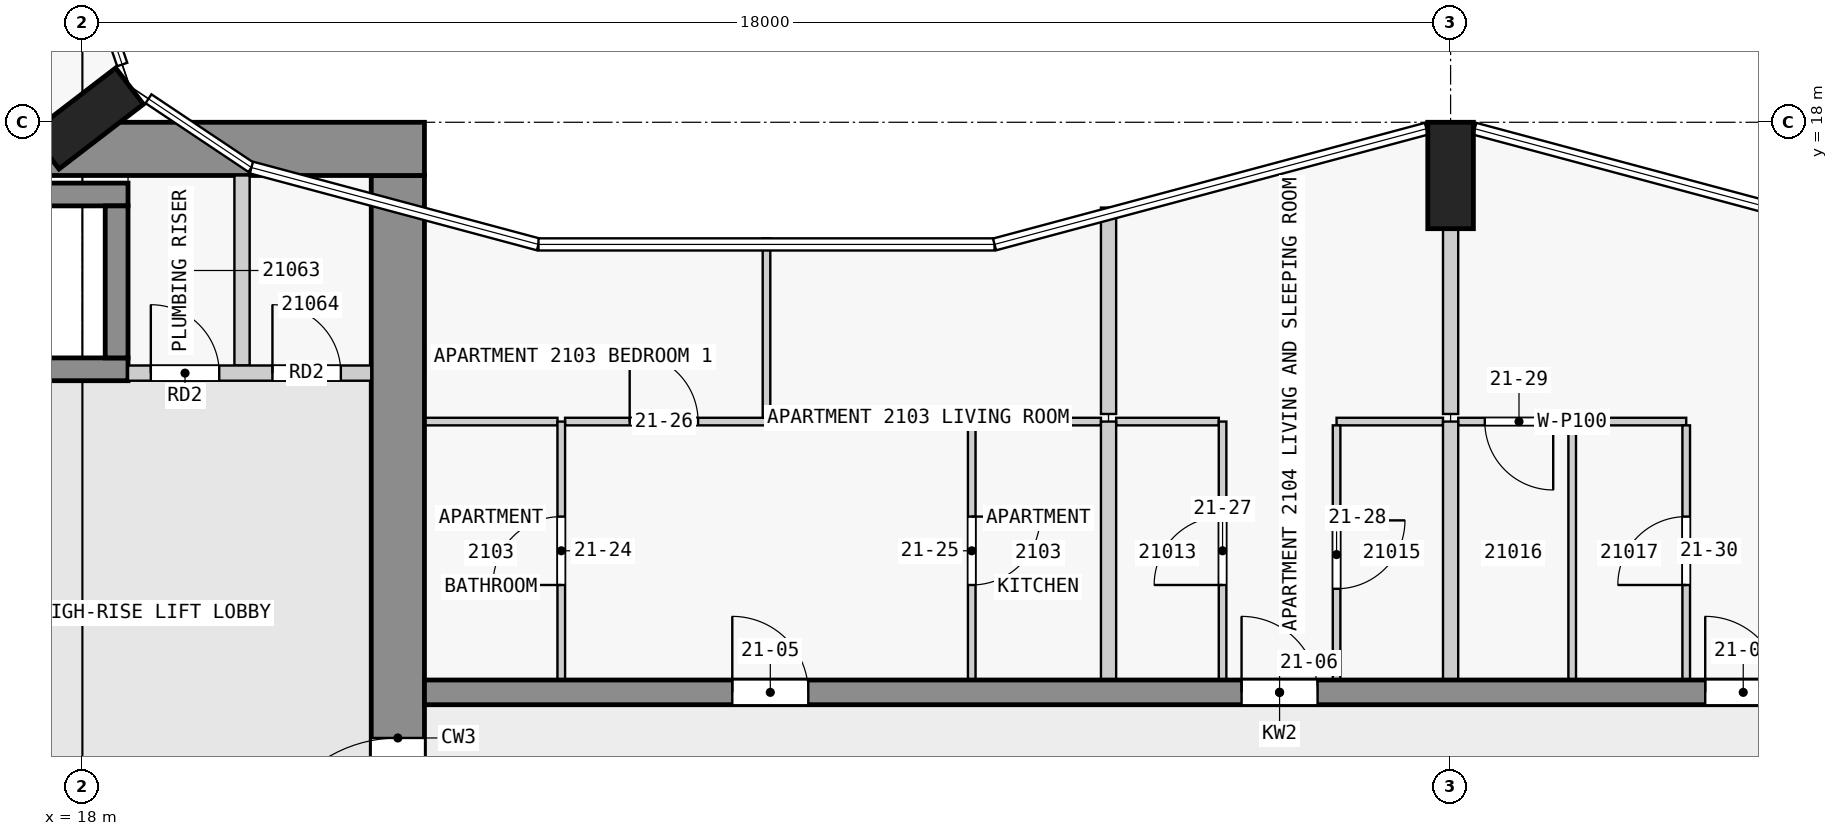
"""IFC4 building model, lengths in metres.
Left out: names, types, materials, properties, quantities, classifications, styles, units other than length and angle.
Written with IfcOpenShell. Run it as: python <this file> out.ifc"""

import sys

from ifc_helpers import new_model, si_unit, direction, frame, frame_2d, origin, origin_2d, place, context, subcontext, project, spatial, rectangle, extrude, element, fill, save


model = new_model("IFC4")
c1 = context("Model", 3, precision=1e-05, world=origin(), true_north=direction((0.0, 1.0)))
c2 = subcontext(c1, "Body", "Model", "MODEL_VIEW")
j1 = project(units=[si_unit("LENGTHUNIT", "METRE"), si_unit("PLANEANGLEUNIT", "RADIAN")], contexts=[c1])
p1 = place(None, origin())
s1 = spatial("IfcSite", under=j1, at=p1, CompositionType="ELEMENT")
p2 = place(p1, origin())
s2 = spatial("IfcBuilding", under=s1, at=p2, CompositionType="ELEMENT")
p3 = place(p2, frame((0.0, 0.0, 85.3)))
s3 = spatial("IfcBuildingStorey", under=s2, at=p3, CompositionType="ELEMENT", Elevation=85.3)
for number, where, z_axis, x_axis in (
    (1, (36.0, 17.3, 0.0), (0.0, 0.0, 1.0), (1.0, 0.0, 0.0)),
    (2, (18.065, 18.05, 0.0), (0.0, 0.0, 1.0), (-0.609, 0.793, 0.0)),
):
    element("IfcColumn", number, at=place(p3, frame(where, z_axis=z_axis, x_axis=x_axis)), inside=s3, PredefinedType="COLUMN", context=c2, shape_type="SweptSolid", body=[
        extrude(rectangle(XDim=0.6, YDim=1.4, at=origin_2d()), origin(), (0.0, 0.0, 1.0), 3.5),
    ])
p4 = place(p3, frame((1.6, 17.65, 0.0), z_axis=(0.0, 0.0, 1.0), x_axis=(1.0, 0.0, 0.0)))
e3 = element("IfcWall", 3, at=p4, inside=s3, PredefinedType="SHEAR", context=c2, shape_type="SweptSolid", body=[
    extrude(rectangle(XDim=20.9, YDim=0.7, at=frame_2d((10.45, 0.0))), origin(), (0.0, 0.0, 1.0), 3.25),
])
p5 = place(p4, frame((6.5, 0.0, 0.0)))
e4 = element("IfcOpeningElement", 4, at=p5, cuts=e3, PredefinedType="OPENING", context=c2, shape_type="SweptSolid", body=[
    extrude(rectangle(XDim=1.8, YDim=2.1, at=frame_2d((0.9, 1.05))), frame((0.0, 0.36, 0.0), z_axis=(0.0, -1.0, 0.0), x_axis=(1.0, 0.0, 0.0)), (0.0, 0.0, 1.0), 0.72),
])
p6 = place(p3, frame((22.15, 2.5, 0.0), z_axis=(0.0, 0.0, 1.0), x_axis=(0.0, 1.0, 0.0)))
e5 = element("IfcWall", 5, at=p6, inside=s3, PredefinedType="SHEAR", context=c2, shape_type="SweptSolid", body=[
    extrude(rectangle(XDim=14.8, YDim=0.7, at=frame_2d((7.4, 0.0))), origin(), (0.0, 0.0, 1.0), 3.25),
])
p7 = place(p6, frame((5.6, 0.0, 0.0)))
e6 = element("IfcOpeningElement", 6, at=p7, cuts=e5, PredefinedType="OPENING", context=c2, shape_type="SweptSolid", body=[
    extrude(rectangle(XDim=1.8, YDim=2.1, at=frame_2d((0.9, 1.05))), frame((0.0, 0.36, 0.0), z_axis=(0.0, -1.0, 0.0), x_axis=(1.0, 0.0, 0.0)), (0.0, 0.0, 1.0), 0.72),
])
for number, where, z_axis, x_axis in (
    (7, (10.8, 17.05, 0.0), (0.0, 0.0, 1.0), (1.0, 0.0, 0.0)),
    (8, (10.8, 14.75, 0.0), (0.0, 0.0, 1.0), (1.0, 0.0, 0.0)),
):
    element("IfcWall", number, at=place(p3, frame(where, z_axis=z_axis, x_axis=x_axis)), inside=s3, PredefinedType="SHEAR", context=c2, shape_type="SweptSolid", body=[
        extrude(rectangle(XDim=7.8, YDim=0.3, at=frame_2d((3.9, 0.0))), origin(), (0.0, 0.0, 1.0), 3.25),
    ])
p8 = place(p3, frame((18.45, 14.9, 0.0), z_axis=(0.0, 0.0, 1.0), x_axis=(0.0, 1.0, 0.0)))
e9 = element("IfcWall", 9, at=p8, inside=s3, PredefinedType="SHEAR", context=c2, shape_type="SweptSolid", body=[
    extrude(rectangle(XDim=2.0, YDim=0.3, at=frame_2d((1.0, 0.0))), origin(), (0.0, 0.0, 1.0), 3.25),
])
p9 = place(p3, frame((22.5, 10.5, 0.0), z_axis=(0.0, 0.0, 1.0), x_axis=(1.0, 0.0, 0.0)))
e10 = element("IfcWall", 10, at=p9, inside=s3, PredefinedType="SHEAR", context=c2, shape_type="SweptSolid", body=[
    extrude(rectangle(XDim=22.5, YDim=0.325, at=frame_2d((11.25, 0.0))), origin(), (0.0, 0.0, 1.0), 3.25),
])
p10 = place(p9, frame((4.05, 0.0, 0.0)))
e11 = element("IfcOpeningElement", 11, at=p10, cuts=e10, PredefinedType="OPENING", context=c2, shape_type="SweptSolid", body=[
    extrude(rectangle(XDim=1.0, YDim=2.1, at=frame_2d((0.5, 1.05))), frame((0.0, 0.172, 0.0), z_axis=(0.0, -1.0, 0.0), x_axis=(1.0, 0.0, 0.0)), (0.0, 0.0, 1.0), 0.345),
])
p11 = place(p9, frame((10.75, 0.0, 0.0)))
e12 = element("IfcOpeningElement", 12, at=p11, cuts=e10, PredefinedType="OPENING", context=c2, shape_type="SweptSolid", body=[
    extrude(rectangle(XDim=1.0, YDim=2.1, at=frame_2d((0.5, 1.05))), frame((0.0, 0.172, 0.0), z_axis=(0.0, -1.0, 0.0), x_axis=(1.0, 0.0, 0.0)), (0.0, 0.0, 1.0), 0.345),
])
p12 = place(p9, frame((16.85, 0.0, 0.0)))
e13 = element("IfcOpeningElement", 13, at=p12, cuts=e10, PredefinedType="OPENING", context=c2, shape_type="SweptSolid", body=[
    extrude(rectangle(XDim=1.0, YDim=2.1, at=frame_2d((0.5, 1.05))), frame((0.0, 0.172, 0.0), z_axis=(0.0, -1.0, 0.0), x_axis=(1.0, 0.0, 0.0)), (0.0, 0.0, 1.0), 0.345),
])
p13 = place(p3, frame((18.6, 14.7, 0.0), z_axis=(0.0, 0.0, 1.0), x_axis=(1.0, 0.0, 0.0)))
e14 = element("IfcWall", 14, at=p13, inside=s3, PredefinedType="PARTITIONING", context=c2, shape_type="SweptSolid", body=[
    extrude(rectangle(XDim=3.2, YDim=0.2, at=frame_2d((1.6, 0.0))), origin(), (0.0, 0.0, 1.0), 3.25),
])
p14 = place(p13, frame((0.3, 0.0, 0.0)))
e15 = element("IfcOpeningElement", 15, at=p14, cuts=e14, PredefinedType="OPENING", context=c2, shape_type="SweptSolid", body=[
    extrude(rectangle(XDim=0.9, YDim=2.1, at=frame_2d((0.45, 1.05))), frame((0.0, 0.11, 0.0), z_axis=(0.0, -1.0, 0.0), x_axis=(1.0, 0.0, 0.0)), (0.0, 0.0, 1.0), 0.22),
])
p15 = place(p13, frame((1.9, 0.0, 0.0)))
e16 = element("IfcOpeningElement", 16, at=p15, cuts=e14, PredefinedType="OPENING", context=c2, shape_type="SweptSolid", body=[
    extrude(rectangle(XDim=0.9, YDim=2.1, at=frame_2d((0.45, 1.05))), frame((0.0, 0.11, 0.0), z_axis=(0.0, -1.0, 0.0), x_axis=(1.0, 0.0, 0.0)), (0.0, 0.0, 1.0), 0.22),
])
p16 = place(p3, frame((20.1, 14.8, 0.0), z_axis=(0.0, 0.0, 1.0), x_axis=(0.0, 1.0, 0.0)))
e17 = element("IfcWall", 17, at=p16, inside=s3, PredefinedType="PARTITIONING", context=c2, shape_type="SweptSolid", body=[
    extrude(rectangle(XDim=2.5, YDim=0.2, at=frame_2d((1.25, 0.0))), origin(), (0.0, 0.0, 1.0), 3.25),
])
p17 = place(p3, frame((24.25, 14.062, 0.0), z_axis=(0.0, 0.0, 1.0), x_axis=(-1.0, 0.0, 0.0)))
e18 = element("IfcWall", 18, at=p17, inside=s3, PredefinedType="PARTITIONING", context=c2, shape_type="SweptSolid", body=[
    extrude(rectangle(XDim=1.75, YDim=0.1, at=frame_2d((0.875, 0.0))), origin(), (0.0, 0.0, 1.0), 3.25),
])
p18 = place(p3, frame((31.4, 14.062, 0.0), z_axis=(0.0, 0.0, 1.0), x_axis=(-1.0, 0.0, 0.0)))
e19 = element("IfcWall", 19, at=p18, inside=s3, PredefinedType="PARTITIONING", context=c2, shape_type="SweptSolid", body=[
    extrude(rectangle(XDim=1.65, YDim=0.1, at=frame_2d((0.825, 0.0))), origin(), (0.0, 0.0, 1.0), 3.25),
])
p19 = place(p3, frame((32.95, 14.062, 0.0), z_axis=(0.0, 0.0, 1.0), x_axis=(-1.0, 0.0, 0.0)))
e20 = element("IfcWall", 20, at=p19, inside=s3, PredefinedType="PARTITIONING", context=c2, shape_type="SweptSolid", body=[
    extrude(rectangle(XDim=1.35, YDim=0.1, at=frame_2d((0.675, 0.0))), origin(), (0.0, 0.0, 1.0), 3.25),
])
p20 = place(p3, frame((35.9, 14.062, 0.0), z_axis=(0.0, 0.0, 1.0), x_axis=(-1.0, 0.0, 0.0)))
e21 = element("IfcWall", 21, at=p20, inside=s3, PredefinedType="PARTITIONING", context=c2, shape_type="SweptSolid", body=[
    extrude(rectangle(XDim=1.4, YDim=0.1, at=frame_2d((0.7, 0.0))), origin(), (0.0, 0.0, 1.0), 3.25),
])
p21 = place(p3, frame((39.1, 14.062, 0.0), z_axis=(0.0, 0.0, 1.0), x_axis=(-1.0, 0.0, 0.0)))
e22 = element("IfcWall", 22, at=p21, inside=s3, PredefinedType="PARTITIONING", context=c2, shape_type="SweptSolid", body=[
    extrude(rectangle(XDim=3.0, YDim=0.1, at=frame_2d((1.5, 0.0))), origin(), (0.0, 0.0, 1.0), 3.25),
])
p22 = place(p21, frame((1.75, 0.0, 0.0)))
e23 = element("IfcOpeningElement", 23, at=p22, cuts=e22, PredefinedType="OPENING", context=c2, shape_type="SweptSolid", body=[
    extrude(rectangle(XDim=0.9, YDim=2.1, at=frame_2d((0.45, 1.05))), frame((0.0, 0.06, 0.0), z_axis=(0.0, -1.0, 0.0), x_axis=(1.0, 0.0, 0.0)), (0.0, 0.0, 1.0), 0.12),
])
p23 = place(p3, frame((24.35, 14.062, 0.0), z_axis=(0.0, 0.0, 1.0), x_axis=(1.0, 0.0, 0.0)))
e24 = element("IfcWall", 24, at=p23, inside=s3, PredefinedType="PARTITIONING", context=c2, shape_type="SweptSolid", body=[
    extrude(rectangle(XDim=2.65, YDim=0.1, at=frame_2d((1.325, 0.0))), origin(), (0.0, 0.0, 1.0), 3.25),
])
p24 = place(p23, frame((0.85, 0.0, 0.0)))
e25 = element("IfcOpeningElement", 25, at=p24, cuts=e24, PredefinedType="OPENING", context=c2, shape_type="SweptSolid", body=[
    extrude(rectangle(XDim=0.9, YDim=2.1, at=frame_2d((0.45, 1.05))), frame((0.0, 0.06, 0.0), z_axis=(0.0, -1.0, 0.0), x_axis=(1.0, 0.0, 0.0)), (0.0, 0.0, 1.0), 0.12),
])
p25 = place(p3, frame((24.3, 10.663, 0.0), z_axis=(0.0, 0.0, 1.0), x_axis=(0.0, 1.0, 0.0)))
e26 = element("IfcWall", 26, at=p25, inside=s3, PredefinedType="PARTITIONING", context=c2, shape_type="SweptSolid", body=[
    extrude(rectangle(XDim=3.4, YDim=0.1, at=frame_2d((1.7, 0.0))), origin(), (0.0, 0.0, 1.0), 3.25),
])
p26 = place(p25, frame((1.25, 0.0, 0.0)))
e27 = element("IfcOpeningElement", 27, at=p26, cuts=e26, PredefinedType="OPENING", context=c2, shape_type="SweptSolid", body=[
    extrude(rectangle(XDim=0.9, YDim=2.1, at=frame_2d((0.45, 1.05))), frame((0.0, 0.06, 0.0), z_axis=(0.0, -1.0, 0.0), x_axis=(1.0, 0.0, 0.0)), (0.0, 0.0, 1.0), 0.12),
])
p27 = place(p3, frame((27.0, 14.113, 0.0), z_axis=(0.0, 0.0, 1.0), x_axis=(0.0, 1.0, 0.0)))
e28 = element("IfcWall", 28, at=p27, inside=s3, PredefinedType="PARTITIONING", context=c2, shape_type="SweptSolid", body=[
    extrude(rectangle(XDim=2.361, YDim=0.1, at=frame_2d((1.18, 0.0))), origin(), (0.0, 0.0, 1.0), 3.25),
])
p28 = place(p3, frame((29.7, 14.062, 0.0), z_axis=(0.0, 0.0, 1.0), x_axis=(0.0, -1.0, 0.0)))
e29 = element("IfcWall", 29, at=p28, inside=s3, PredefinedType="PARTITIONING", context=c2, shape_type="SweptSolid", body=[
    extrude(rectangle(XDim=3.4, YDim=0.1, at=frame_2d((1.7, 0.0))), origin(), (0.0, 0.0, 1.0), 3.25),
])
p29 = place(p28, frame((1.25, 0.0, 0.0)))
e30 = element("IfcOpeningElement", 30, at=p29, cuts=e29, PredefinedType="OPENING", context=c2, shape_type="SweptSolid", body=[
    extrude(rectangle(XDim=0.9, YDim=2.1, at=frame_2d((0.45, 1.05))), frame((0.0, 0.06, 0.0), z_axis=(0.0, -1.0, 0.0), x_axis=(1.0, 0.0, 0.0)), (0.0, 0.0, 1.0), 0.12),
])
p30 = place(p3, frame((31.5, 16.878, 0.0), z_axis=(0.0, 0.0, 1.0), x_axis=(0.0, -1.0, 0.0)))
e31 = element("IfcWall", 31, at=p30, inside=s3, PredefinedType="PARTITIONING", context=c2, shape_type="SweptSolid", body=[
    extrude(rectangle(XDim=2.715, YDim=0.2, at=frame_2d((1.357, 0.0))), origin(), (0.0, 0.0, 1.0), 3.25),
])
p31 = place(p3, frame((31.5, 10.663, 0.0), z_axis=(0.0, 0.0, 1.0), x_axis=(0.0, 1.0, 0.0)))
e32 = element("IfcWall", 32, at=p31, inside=s3, PredefinedType="PARTITIONING", context=c2, shape_type="SweptSolid", body=[
    extrude(rectangle(XDim=3.4, YDim=0.2, at=frame_2d((1.7, 0.0))), origin(), (0.0, 0.0, 1.0), 3.25),
])
p32 = place(p3, frame((33.0, 10.663, 0.0), z_axis=(0.0, 0.0, 1.0), x_axis=(0.0, 1.0, 0.0)))
e33 = element("IfcWall", 33, at=p32, inside=s3, PredefinedType="PARTITIONING", context=c2, shape_type="SweptSolid", body=[
    extrude(rectangle(XDim=3.4, YDim=0.1, at=frame_2d((1.7, 0.0))), origin(), (0.0, 0.0, 1.0), 3.25),
])
p33 = place(p32, frame((1.25, 0.0, 0.0)))
e34 = element("IfcOpeningElement", 34, at=p33, cuts=e33, PredefinedType="OPENING", context=c2, shape_type="SweptSolid", body=[
    extrude(rectangle(XDim=0.9, YDim=2.1, at=frame_2d((0.45, 1.05))), frame((0.0, 0.06, 0.0), z_axis=(0.0, -1.0, 0.0), x_axis=(1.0, 0.0, 0.0)), (0.0, 0.0, 1.0), 0.12),
])
p34 = place(p3, frame((34.5, 14.012, 0.0), z_axis=(0.0, 0.0, 1.0), x_axis=(0.0, -1.0, 0.0)))
e35 = element("IfcWall", 35, at=p34, inside=s3, PredefinedType="PARTITIONING", context=c2, shape_type="SweptSolid", body=[
    extrude(rectangle(XDim=3.35, YDim=0.1, at=frame_2d((1.675, 0.0))), origin(), (0.0, 0.0, 1.0), 3.25),
])
p35 = place(p34, frame((1.25, 0.0, 0.0)))
e36 = element("IfcOpeningElement", 36, at=p35, cuts=e35, PredefinedType="OPENING", context=c2, shape_type="SweptSolid", body=[
    extrude(rectangle(XDim=0.9, YDim=2.1, at=frame_2d((0.45, 1.05))), frame((0.0, 0.06, 0.0), z_axis=(0.0, -1.0, 0.0), x_axis=(1.0, 0.0, 0.0)), (0.0, 0.0, 1.0), 0.12),
])
p36 = place(p3, frame((36.0, 16.6, 0.0), z_axis=(0.0, 0.0, 1.0), x_axis=(0.0, -1.0, 0.0)))
e37 = element("IfcWall", 37, at=p36, inside=s3, PredefinedType="PARTITIONING", context=c2, shape_type="SweptSolid", body=[
    extrude(rectangle(XDim=2.438, YDim=0.2, at=frame_2d((1.219, 0.0))), origin(), (0.0, 0.0, 1.0), 3.25),
])
p37 = place(p3, frame((36.0, 10.663, 0.0), z_axis=(0.0, 0.0, 1.0), x_axis=(0.0, 1.0, 0.0)))
e38 = element("IfcWall", 38, at=p37, inside=s3, PredefinedType="PARTITIONING", context=c2, shape_type="SweptSolid", body=[
    extrude(rectangle(XDim=3.4, YDim=0.2, at=frame_2d((1.7, 0.0))), origin(), (0.0, 0.0, 1.0), 3.25),
])
p38 = place(p3, frame((37.6, 10.663, 0.0), z_axis=(0.0, 0.0, 1.0), x_axis=(0.0, 1.0, 0.0)))
e39 = element("IfcWall", 39, at=p38, inside=s3, PredefinedType="PARTITIONING", context=c2, shape_type="SweptSolid", body=[
    extrude(rectangle(XDim=3.35, YDim=0.1, at=frame_2d((1.675, 0.0))), origin(), (0.0, 0.0, 1.0), 3.25),
])
p39 = place(p3, frame((39.1, 10.663, 0.0), z_axis=(0.0, 0.0, 1.0), x_axis=(0.0, 1.0, 0.0)))
e40 = element("IfcWall", 40, at=p39, inside=s3, PredefinedType="PARTITIONING", context=c2, shape_type="SweptSolid", body=[
    extrude(rectangle(XDim=3.35, YDim=0.1, at=frame_2d((1.675, 0.0))), origin(), (0.0, 0.0, 1.0), 3.25),
])
p40 = place(p39, frame((1.25, 0.0, 0.0)))
e41 = element("IfcOpeningElement", 41, at=p40, cuts=e40, PredefinedType="OPENING", context=c2, shape_type="SweptSolid", body=[
    extrude(rectangle(XDim=0.9, YDim=2.1, at=frame_2d((0.45, 1.05))), frame((0.0, 0.06, 0.0), z_axis=(0.0, -1.0, 0.0), x_axis=(1.0, 0.0, 0.0)), (0.0, 0.0, 1.0), 0.12),
])
p41 = place(p7, origin())
e42 = element("IfcDoor", 42, at=p41, inside=s3, OperationType="DOUBLE_DOOR_SINGLE_SWING", PredefinedType="DOOR", context=c2, shape_type="SweptSolid", body=[
    extrude(rectangle(XDim=1.8, YDim=2.1, at=frame_2d((0.9, 1.05))), frame((0.0, 0.025, 0.0), z_axis=(0.0, -1.0, 0.0), x_axis=(1.0, 0.0, 0.0)), (0.0, 0.0, 1.0), 0.05),
])
fill(e6, e42)
p42 = place(p14, origin())
e43 = element("IfcDoor", 43, at=p42, inside=s3, OperationType="SINGLE_SWING_LEFT", PredefinedType="DOOR", context=c2, shape_type="SweptSolid", body=[
    extrude(rectangle(XDim=0.9, YDim=2.1, at=frame_2d((0.45, 1.05))), frame((0.0, 0.025, 0.0), z_axis=(0.0, -1.0, 0.0), x_axis=(1.0, 0.0, 0.0)), (0.0, 0.0, 1.0), 0.05),
])
fill(e15, e43)
p43 = place(p15, origin())
e44 = element("IfcDoor", 44, at=p43, inside=s3, OperationType="SINGLE_SWING_LEFT", PredefinedType="DOOR", context=c2, shape_type="SweptSolid", body=[
    extrude(rectangle(XDim=0.9, YDim=2.1, at=frame_2d((0.45, 1.05))), frame((0.0, 0.025, 0.0), z_axis=(0.0, -1.0, 0.0), x_axis=(1.0, 0.0, 0.0)), (0.0, 0.0, 1.0), 0.05),
])
fill(e16, e44)
p44 = place(p10, origin())
e45 = element("IfcDoor", 45, at=p44, inside=s3, OperationType="SINGLE_SWING_LEFT", PredefinedType="DOOR", context=c2, shape_type="SweptSolid", body=[
    extrude(rectangle(XDim=1.0, YDim=2.1, at=frame_2d((0.5, 1.05))), frame((0.0, 0.025, 0.0), z_axis=(0.0, -1.0, 0.0), x_axis=(1.0, 0.0, 0.0)), (0.0, 0.0, 1.0), 0.05),
])
fill(e11, e45)
p45 = place(p11, origin())
e46 = element("IfcDoor", 46, at=p45, inside=s3, OperationType="SINGLE_SWING_LEFT", PredefinedType="DOOR", context=c2, shape_type="SweptSolid", body=[
    extrude(rectangle(XDim=1.0, YDim=2.1, at=frame_2d((0.5, 1.05))), frame((0.0, 0.025, 0.0), z_axis=(0.0, -1.0, 0.0), x_axis=(1.0, 0.0, 0.0)), (0.0, 0.0, 1.0), 0.05),
])
fill(e12, e46)
p46 = place(p12, origin())
e47 = element("IfcDoor", 47, at=p46, inside=s3, OperationType="SINGLE_SWING_RIGHT", PredefinedType="DOOR", context=c2, shape_type="SweptSolid", body=[
    extrude(rectangle(XDim=1.0, YDim=2.1, at=frame_2d((0.5, 1.05))), frame((0.0, 0.025, 0.0), z_axis=(0.0, -1.0, 0.0), x_axis=(1.0, 0.0, 0.0)), (0.0, 0.0, 1.0), 0.05),
])
fill(e13, e47)
p47 = place(p26, origin())
e48 = element("IfcDoor", 48, at=p47, inside=s3, OperationType="SINGLE_SWING_LEFT", PredefinedType="DOOR", context=c2, shape_type="SweptSolid", body=[
    extrude(rectangle(XDim=0.9, YDim=2.1, at=frame_2d((0.45, 1.05))), frame((0.0, 0.025, 0.0), z_axis=(0.0, -1.0, 0.0), x_axis=(1.0, 0.0, 0.0)), (0.0, 0.0, 1.0), 0.05),
])
fill(e27, e48)
p48 = place(p29, origin())
e49 = element("IfcDoor", 49, at=p48, inside=s3, OperationType="SINGLE_SWING_LEFT", PredefinedType="DOOR", context=c2, shape_type="SweptSolid", body=[
    extrude(rectangle(XDim=0.9, YDim=2.1, at=frame_2d((0.45, 1.05))), frame((0.0, 0.025, 0.0), z_axis=(0.0, -1.0, 0.0), x_axis=(1.0, 0.0, 0.0)), (0.0, 0.0, 1.0), 0.05),
])
fill(e30, e49)
p49 = place(p24, origin())
e50 = element("IfcDoor", 50, at=p49, inside=s3, OperationType="SINGLE_SWING_LEFT", PredefinedType="DOOR", context=c2, shape_type="SweptSolid", body=[
    extrude(rectangle(XDim=0.9, YDim=2.1, at=frame_2d((0.45, 1.05))), frame((0.0, 0.025, 0.0), z_axis=(0.0, -1.0, 0.0), x_axis=(1.0, 0.0, 0.0)), (0.0, 0.0, 1.0), 0.05),
])
fill(e25, e50)
p50 = place(p33, origin())
e51 = element("IfcDoor", 51, at=p50, inside=s3, OperationType="SINGLE_SWING_LEFT", PredefinedType="DOOR", context=c2, shape_type="SweptSolid", body=[
    extrude(rectangle(XDim=0.9, YDim=2.1, at=frame_2d((0.45, 1.05))), frame((0.0, 0.025, 0.0), z_axis=(0.0, -1.0, 0.0), x_axis=(1.0, 0.0, 0.0)), (0.0, 0.0, 1.0), 0.05),
])
fill(e34, e51)
p51 = place(p35, origin())
e52 = element("IfcDoor", 52, at=p51, inside=s3, OperationType="SINGLE_SWING_RIGHT", PredefinedType="DOOR", context=c2, shape_type="SweptSolid", body=[
    extrude(rectangle(XDim=0.9, YDim=2.1, at=frame_2d((0.45, 1.05))), frame((0.0, 0.025, 0.0), z_axis=(0.0, -1.0, 0.0), x_axis=(1.0, 0.0, 0.0)), (0.0, 0.0, 1.0), 0.05),
])
fill(e36, e52)
p52 = place(p22, origin())
e53 = element("IfcDoor", 53, at=p52, inside=s3, OperationType="SINGLE_SWING_RIGHT", PredefinedType="DOOR", context=c2, shape_type="SweptSolid", body=[
    extrude(rectangle(XDim=0.9, YDim=2.1, at=frame_2d((0.45, 1.05))), frame((0.0, 0.025, 0.0), z_axis=(0.0, -1.0, 0.0), x_axis=(1.0, 0.0, 0.0)), (0.0, 0.0, 1.0), 0.05),
])
fill(e23, e53)
p53 = place(p40, origin())
e54 = element("IfcDoor", 54, at=p53, inside=s3, OperationType="SINGLE_SWING_RIGHT", PredefinedType="DOOR", context=c2, shape_type="SweptSolid", body=[
    extrude(rectangle(XDim=0.9, YDim=2.1, at=frame_2d((0.45, 1.05))), frame((0.0, 0.025, 0.0), z_axis=(0.0, -1.0, 0.0), x_axis=(1.0, 0.0, 0.0)), (0.0, 0.0, 1.0), 0.05),
])
fill(e41, e54)
save(model, sys.argv[1])
